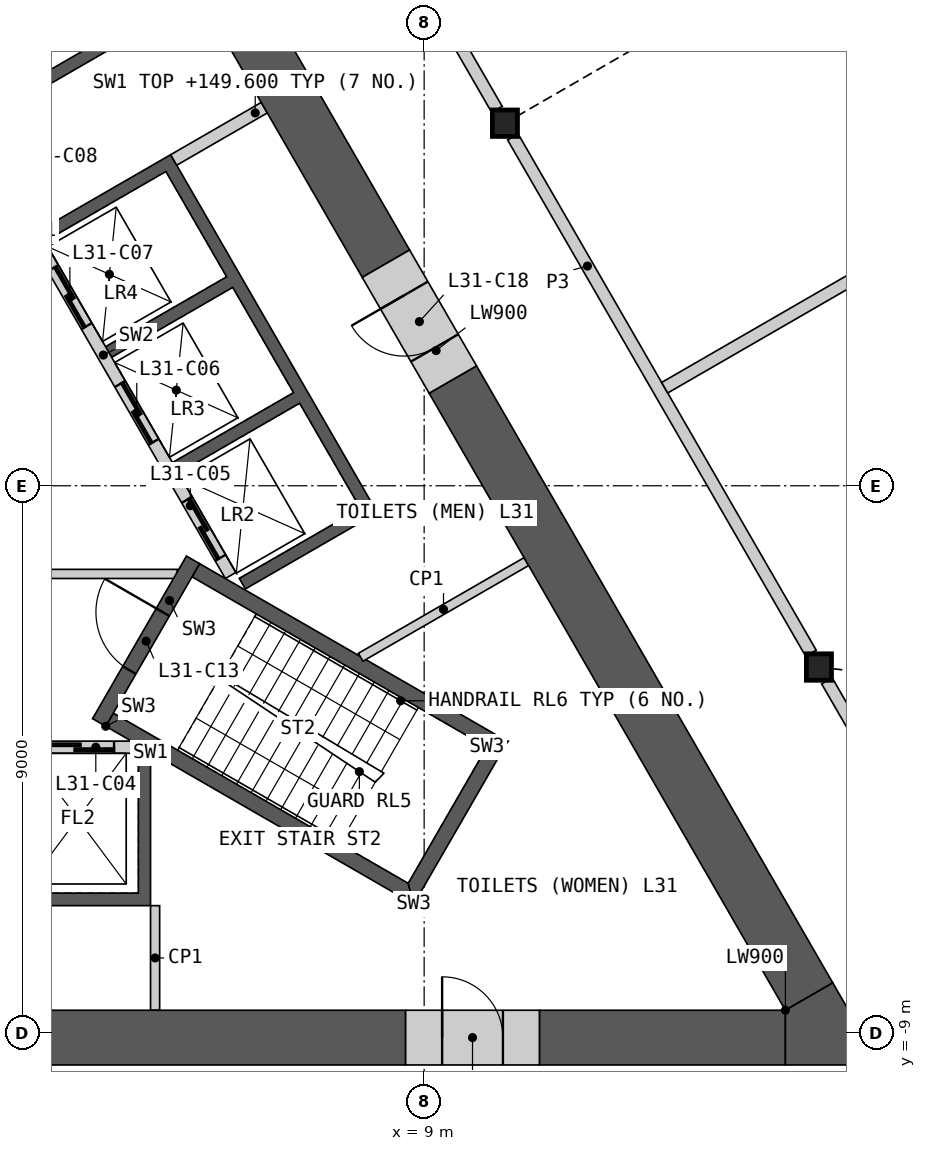
"""IFC4 building model, lengths in metres.
Left out: names, types, materials, properties, quantities, classifications, styles, units other than length and angle.
Written with IfcOpenShell. Run it as: python <this file> out.ifc"""

import sys

from ifc_helpers import new_model, si_unit, direction, frame, frame_2d, origin, origin_2d, place, context, subcontext, project, spatial, polyline, rectangle, i_section, outline, extrude, element, fill, save


model = new_model("IFC4")
c1 = context("Model", 3, precision=1e-05, world=origin(), true_north=direction((0.0, 1.0)))
c2 = subcontext(c1, "Body", "Model", "MODEL_VIEW")
j1 = project(units=[si_unit("LENGTHUNIT", "METRE"), si_unit("PLANEANGLEUNIT", "RADIAN")], contexts=[c1])
p1 = place(None, origin())
s1 = spatial("IfcSite", under=j1, at=p1, CompositionType="ELEMENT")
p2 = place(p1, origin())
s2 = spatial("IfcBuilding", under=s1, at=p2, CompositionType="ELEMENT")
p3 = place(p2, frame((0.0, 0.0, 145.8)))
s3 = spatial("IfcBuildingStorey", under=s2, at=p3, CompositionType="ELEMENT", Elevation=145.8)
for number, where, z_axis, x_axis in (
    (1, (15.493, -2.982, 0.0), (0.0, 0.0, 1.0), (1.0, 0.0, 0.0)),
    (2, (10.328, 5.963, 0.0), (0.0, 0.0, 1.0), (1.0, 0.0, 0.0)),
):
    element("IfcColumn", number, at=place(p3, frame(where, z_axis=z_axis, x_axis=x_axis)), inside=s3, PredefinedType="COLUMN", context=c2, shape_type="SweptSolid", body=[
        extrude(i_section(OverallWidth=0.412, OverallDepth=0.435, WebThickness=0.036, FlangeThickness=0.057, at=origin_2d()), origin(), (0.0, 0.0, 1.0), 4.2),
    ])
p4 = place(p3, origin())
e3 = element("IfcWall", 3, at=p4, inside=s3, PredefinedType="SHEAR", context=c2, shape_type="SweptSolid", body=[
    extrude(outline(polyline([(4.5, -4.4), (4.5, -6.906), (-4.5, -6.906), (-4.5, -4.4), (-4.3, -4.4), (-4.3, -6.7), (-2.3, -6.7), (-2.3, -4.4), (-2.1, -4.4), (-2.1, -6.7), (-0.1, -6.7), (-0.1, -4.4), (0.1, -4.4), (0.1, -6.7), (2.1, -6.7), (2.1, -4.4), (2.3, -4.4), (2.3, -6.7), (4.3, -6.7), (4.3, -4.4), (4.5, -4.4)])), origin(), (0.0, 0.0, 1.0), 3.8),
])
p5 = place(p3, frame((-4.187, -4.3, 0.0), z_axis=(0.0, 0.0, 1.0), x_axis=(1.0, 0.0, 0.0)))
e4 = element("IfcWall", 4, at=p5, inside=s3, PredefinedType="SOLIDWALL", context=c2, shape_type="SweptSolid", body=[
    extrude(rectangle(XDim=8.373, YDim=0.2, at=frame_2d((4.187, 0.0))), origin(), (0.0, 0.0, 1.0), 3.8),
])
p6 = place(p5, frame((0.287, 0.0, 0.0)))
e5 = element("IfcOpeningElement", 5, at=p6, cuts=e4, PredefinedType="OPENING", context=c2, shape_type="SweptSolid", body=[
    extrude(rectangle(XDim=1.2, YDim=2.1, at=frame_2d((0.6, 1.05))), frame((0.0, 0.11, 0.0), z_axis=(0.0, -1.0, 0.0), x_axis=(1.0, 0.0, 0.0)), (0.0, 0.0, 1.0), 0.22),
])
p7 = place(p5, frame((2.387, 0.0, 0.0)))
e6 = element("IfcOpeningElement", 6, at=p7, cuts=e4, PredefinedType="OPENING", context=c2, shape_type="SweptSolid", body=[
    extrude(rectangle(XDim=1.4, YDim=2.1, at=frame_2d((0.7, 1.05))), frame((0.0, 0.11, 0.0), z_axis=(0.0, -1.0, 0.0), x_axis=(1.0, 0.0, 0.0)), (0.0, 0.0, 1.0), 0.22),
])
p8 = place(p5, frame((4.737, 0.0, 0.0)))
e7 = element("IfcOpeningElement", 7, at=p8, cuts=e4, PredefinedType="OPENING", context=c2, shape_type="SweptSolid", body=[
    extrude(rectangle(XDim=1.1, YDim=2.1, at=frame_2d((0.55, 1.05))), frame((0.0, 0.11, 0.0), z_axis=(0.0, -1.0, 0.0), x_axis=(1.0, 0.0, 0.0)), (0.0, 0.0, 1.0), 0.22),
])
p9 = place(p5, frame((6.887, 0.0, 0.0)))
e8 = element("IfcOpeningElement", 8, at=p9, cuts=e4, PredefinedType="OPENING", context=c2, shape_type="SweptSolid", body=[
    extrude(rectangle(XDim=1.2, YDim=2.1, at=frame_2d((0.6, 1.05))), frame((0.0, 0.11, 0.0), z_axis=(0.0, -1.0, 0.0), x_axis=(1.0, 0.0, 0.0)), (0.0, 0.0, 1.0), 0.22),
])
p10 = place(p3, origin())
e9 = element("IfcWall", 9, at=p10, inside=s3, PredefinedType="SHEAR", context=c2, shape_type="SweptSolid", body=[
    extrude(outline(polyline([(1.561, 6.097), (3.731, 7.35), (3.831, 7.177), (1.66, 5.924), (1.561, 6.097)])), origin(), (0.0, 0.0, 1.0), 3.8),
])
p11 = place(p3, origin())
e10 = element("IfcWall", 10, at=p11, inside=s3, PredefinedType="SHEAR", context=c2, shape_type="SweptSolid", body=[
    extrude(outline(polyline([(2.66, 4.192), (4.831, 5.445), (8.231, -0.444), (6.061, -1.697), (5.96, -1.524), (7.952, -0.374), (6.952, 1.358), (4.96, 0.208), (4.861, 0.381), (6.852, 1.531), (5.852, 3.263), (3.861, 2.113), (3.76, 2.287), (5.752, 3.437), (4.752, 5.169), (2.76, 4.019), (2.66, 4.192)])), origin(), (0.0, 0.0, 1.0), 3.8),
])
p12 = place(p3, frame((5.817, -1.476, 0.0), z_axis=(0.0, 0.0, 1.0), x_axis=(-0.500002616675, 0.866023893041, 0.0)))
e11 = element("IfcWall", 11, at=p12, inside=s3, PredefinedType="SOLIDWALL", context=c2, shape_type="SweptSolid", body=[
    extrude(rectangle(XDim=8.373, YDim=0.2, at=frame_2d((4.187, 0.0))), origin(), (0.0, 0.0, 1.0), 3.8),
])
p13 = place(p12, frame((0.337, 0.0, 0.0)))
e12 = element("IfcOpeningElement", 12, at=p13, cuts=e11, PredefinedType="OPENING", context=c2, shape_type="SweptSolid", body=[
    extrude(rectangle(XDim=1.1, YDim=2.1, at=frame_2d((0.55, 1.05))), frame((0.0, 0.11, 0.0), z_axis=(0.0, -1.0, 0.0), x_axis=(1.0, 0.0, 0.0)), (0.0, 0.0, 1.0), 0.22),
])
p14 = place(p12, frame((2.537, 0.0, 0.0)))
e13 = element("IfcOpeningElement", 13, at=p14, cuts=e11, PredefinedType="OPENING", context=c2, shape_type="SweptSolid", body=[
    extrude(rectangle(XDim=1.1, YDim=2.1, at=frame_2d((0.55, 1.05))), frame((0.0, 0.11, 0.0), z_axis=(0.0, -1.0, 0.0), x_axis=(1.0, 0.0, 0.0)), (0.0, 0.0, 1.0), 0.22),
])
p15 = place(p12, frame((4.737, 0.0, 0.0)))
e14 = element("IfcOpeningElement", 14, at=p15, cuts=e11, PredefinedType="OPENING", context=c2, shape_type="SweptSolid", body=[
    extrude(rectangle(XDim=1.1, YDim=2.1, at=frame_2d((0.55, 1.05))), frame((0.0, 0.11, 0.0), z_axis=(0.0, -1.0, 0.0), x_axis=(1.0, 0.0, 0.0)), (0.0, 0.0, 1.0), 0.22),
])
p16 = place(p12, frame((7.037, 0.0, 0.0)))
e15 = element("IfcOpeningElement", 15, at=p16, cuts=e11, PredefinedType="OPENING", context=c2, shape_type="SweptSolid", body=[
    extrude(rectangle(XDim=0.9, YDim=2.1, at=frame_2d((0.45, 1.05))), frame((0.0, 0.11, 0.0), z_axis=(0.0, -1.0, 0.0), x_axis=(1.0, 0.0, 0.0)), (0.0, 0.0, 1.0), 0.22),
])
p17 = place(p3, frame((4.881, 5.358, 0.0), z_axis=(0.0, 0.0, 1.0), x_axis=(0.866024871741, 0.500000921525, 0.0)))
e16 = element("IfcWall", 16, at=p17, inside=s3, PredefinedType="SHEAR", context=c2, shape_type="SweptSolid", body=[
    extrude(rectangle(XDim=1.72, YDim=0.2, at=frame_2d((0.86, 0.0))), origin(), (0.0, 0.0, 1.0), 3.8),
])
p18 = place(p3, frame((-4.941, -1.45, 0.0), z_axis=(0.0, 0.0, 1.0), x_axis=(1.0, 0.0, 0.0)))
e17 = element("IfcWall", 17, at=p18, inside=s3, PredefinedType="PARTITIONING", context=c2, shape_type="SweptSolid", body=[
    extrude(rectangle(XDim=9.882, YDim=0.15, at=frame_2d((4.941, 0.0))), origin(), (0.0, 0.0, 1.0), 3.8),
])
p19 = place(p18, frame((4.391, 0.0, 0.0)))
e18 = element("IfcOpeningElement", 18, at=p19, cuts=e17, PredefinedType="OPENING", context=c2, shape_type="SweptSolid", body=[
    extrude(rectangle(XDim=1.1, YDim=2.1, at=frame_2d((0.55, 1.05))), frame((0.0, 0.085, 0.0), z_axis=(0.0, -1.0, 0.0), x_axis=(1.0, 0.0, 0.0)), (0.0, 0.0, 1.0), 0.17),
])
p20 = place(p3, origin())
e19 = element("IfcWall", 19, at=p20, inside=s3, PredefinedType="SHEAR", context=c2, shape_type="SweptSolid", body=[
    extrude(outline(polyline([(3.763, -3.956), (8.83, -6.881), (8.738, -6.539), (3.888, -3.739), (3.763, -3.956)])), origin(), (0.0, 0.0, 1.0), 3.8),
])
p21 = place(p3, origin())
e20 = element("IfcWall", 20, at=p21, inside=s3, PredefinedType="SHEAR", context=c2, shape_type="SweptSolid", body=[
    extrude(outline(polyline([(8.83, -6.881), (10.374, -4.206), (10.032, -4.298), (8.738, -6.539), (8.83, -6.881)])), origin(), (0.0, 0.0, 1.0), 3.8),
])
p22 = place(p3, origin())
e21 = element("IfcWall", 21, at=p22, inside=s3, PredefinedType="SHEAR", context=c2, shape_type="SweptSolid", body=[
    extrude(outline(polyline([(10.032, -4.298), (10.374, -4.206), (5.307, -1.281), (5.182, -1.498), (10.032, -4.298)])), origin(), (0.0, 0.0, 1.0), 3.8),
])
p23 = place(p3, frame((3.655, -3.893, 0.0), z_axis=(0.0, 0.0, 1.0), x_axis=(0.499982516597, 0.866035497597, 0.0)))
e22 = element("IfcWall", 22, at=p23, inside=s3, PredefinedType="SHEAR", context=c2, shape_type="SweptSolid", body=[
    extrude(rectangle(XDim=3.088, YDim=0.25, at=frame_2d((1.544, 0.0))), origin(), (0.0, 0.0, 1.0), 3.8),
])
p24 = place(p23, frame((0.994, 0.0, 0.0)))
e23 = element("IfcOpeningElement", 23, at=p24, cuts=e22, PredefinedType="OPENING", context=c2, shape_type="SweptSolid", body=[
    extrude(rectangle(XDim=1.1, YDim=2.1, at=frame_2d((0.55, 1.05))), frame((0.0, 0.135, 0.0), z_axis=(0.0, -1.0, 0.0), x_axis=(1.0, 0.0, 0.0)), (0.0, 0.0, 1.0), 0.27),
])
p25 = place(p3, frame((4.575, -6.906, 0.0), z_axis=(0.0, 0.0, 1.0), x_axis=(0.0, -1.0, 0.0)))
e24 = element("IfcWall", 24, at=p25, inside=s3, PredefinedType="PARTITIONING", context=c2, shape_type="SweptSolid", body=[
    extrude(rectangle(XDim=1.72, YDim=0.15, at=frame_2d((0.86, 0.0))), origin(), (0.0, 0.0, 1.0), 3.8),
])
p26 = place(p3, frame((10.681, -1.247, 0.0), z_axis=(0.0, 0.0, 1.0), x_axis=(-0.866018897435, -0.500011269158, 0.0)))
e25 = element("IfcWall", 25, at=p26, inside=s3, PredefinedType="PARTITIONING", context=c2, shape_type="SweptSolid", body=[
    extrude(rectangle(XDim=3.146, YDim=0.15, at=frame_2d((1.573, 0.0))), origin(), (0.0, 0.0, 1.0), 3.8),
])
p27 = place(p3, frame((1.1, -9.076, 0.0), z_axis=(0.0, 0.0, 1.0), x_axis=(1.0, 0.0, 0.0)))
e26 = element("IfcWall", 26, at=p27, inside=s3, PredefinedType="SHEAR", context=c2, shape_type="SweptSolid", body=[
    extrude(rectangle(XDim=7.595, YDim=0.9, at=frame_2d((3.798, 0.0))), origin(), (0.0, 0.0, 1.0), 3.8),
])
p28 = place(p3, frame((10.896, -9.076, 0.0), z_axis=(0.0, 0.0, 1.0), x_axis=(1.0, 0.0, 0.0)))
e27 = element("IfcWall", 27, at=p28, inside=s3, PredefinedType="SHEAR", context=c2, shape_type="SweptSolid", body=[
    extrude(rectangle(XDim=4.046, YDim=0.9, at=frame_2d((2.023, 0.0))), origin(), (0.0, 0.0, 1.0), 3.8),
])
p29 = place(p3, frame((8.372, 3.652, 0.0), z_axis=(0.0, 0.0, 1.0), x_axis=(-0.499997808738, 0.866026668906, 0.0)))
e28 = element("IfcWall", 28, at=p29, inside=s3, PredefinedType="SHEAR", context=c2, shape_type="SweptSolid", body=[
    extrude(rectangle(XDim=15.964, YDim=0.9, at=frame_2d((7.982, 0.0))), origin(), (0.0, 0.0, 1.0), 3.8),
])
p30 = place(p3, frame((15.331, -8.401, 0.0), z_axis=(0.0, 0.0, 1.0), x_axis=(-0.499995375004, 0.86602807401, 0.0)))
e29 = element("IfcWall", 29, at=p30, inside=s3, PredefinedType="SHEAR", context=c2, shape_type="SweptSolid", body=[
    extrude(rectangle(XDim=11.718, YDim=0.9, at=frame_2d((5.859, 0.0))), origin(), (0.0, 0.0, 1.0), 3.8),
])
p31 = place(p3, origin())
e30 = element("IfcWall", 30, at=p31, inside=s3, PredefinedType="SHEAR", context=c2, shape_type="SweptSolid", body=[
    extrude(outline(polyline([(14.941, -8.626), (15.721, -8.176), (16.5, -9.526), (14.941, -9.526), (14.941, -8.626)])), origin(), (0.0, 0.0, 1.0), 3.8),
])
p32 = place(p3, frame((8.696, -9.076, 0.0), z_axis=(0.0, 0.0, 1.0), x_axis=(1.0, 0.0, 0.0)))
e31 = element("IfcWall", 31, at=p32, inside=s3, PredefinedType="SHEAR", context=c2, shape_type="SweptSolid", body=[
    extrude(rectangle(XDim=2.2, YDim=0.9, at=frame_2d((1.1, 0.0))), origin(), (0.0, 0.0, 1.0), 3.8),
])
p33 = place(p32, frame((0.6, 0.0, 0.0)))
e32 = element("IfcOpeningElement", 32, at=p33, cuts=e31, PredefinedType="OPENING", context=c2, shape_type="SweptSolid", body=[
    extrude(rectangle(XDim=1.0, YDim=2.1, at=frame_2d((0.5, 1.05))), frame((0.0, 0.46, 0.0), z_axis=(0.0, -1.0, 0.0), x_axis=(1.0, 0.0, 0.0)), (0.0, 0.0, 1.0), 0.92),
])
p34 = place(p3, frame((9.472, 1.747, 0.0), z_axis=(0.0, 0.0, 1.0), x_axis=(-0.50002983664, 0.866008176907, 0.0)))
e33 = element("IfcWall", 33, at=p34, inside=s3, PredefinedType="SHEAR", context=c2, shape_type="SweptSolid", body=[
    extrude(rectangle(XDim=2.2, YDim=0.9, at=frame_2d((1.1, 0.0))), origin(), (0.0, 0.0, 1.0), 3.8),
])
p35 = place(p34, frame((0.6, 0.0, 0.0)))
e34 = element("IfcOpeningElement", 34, at=p35, cuts=e33, PredefinedType="OPENING", context=c2, shape_type="SweptSolid", body=[
    extrude(rectangle(XDim=1.0, YDim=2.1, at=frame_2d((0.5, 1.05))), frame((0.0, 0.46, 0.0), z_axis=(0.0, -1.0, 0.0), x_axis=(1.0, 0.0, 0.0)), (0.0, 0.0, 1.0), 0.92),
])
p36 = place(p3, frame((10.46, 5.736, 0.0), z_axis=(0.0, 0.0, 1.0), x_axis=(0.500004141693, -0.866023012564, 0.0)))
e35 = element("IfcWall", 35, at=p36, inside=s3, PredefinedType="PARTITIONING", context=c2, shape_type="SweptSolid", body=[
    extrude(rectangle(XDim=9.803, YDim=0.2, at=frame_2d((4.902, 0.0))), origin(), (0.0, 0.0, 1.0), 3.8),
])
p37 = place(p3, frame((5.295, 14.68, 0.0), z_axis=(0.0, 0.0, 1.0), x_axis=(0.500012035596, -0.866018454918, 0.0)))
e36 = element("IfcWall", 36, at=p37, inside=s3, PredefinedType="PARTITIONING", context=c2, shape_type="SweptSolid", body=[
    extrude(rectangle(XDim=9.803, YDim=0.2, at=frame_2d((4.902, 0.0))), origin(), (0.0, 0.0, 1.0), 3.8),
])
p38 = place(p37, frame((6.853, 0.0, 0.0)))
e37 = element("IfcOpeningElement", 37, at=p38, cuts=e36, PredefinedType="OPENING", context=c2, shape_type="SweptSolid", body=[
    extrude(rectangle(XDim=1.0, YDim=2.1, at=frame_2d((0.5, 1.05))), frame((0.0, 0.11, 0.0), z_axis=(0.0, -1.0, 0.0), x_axis=(1.0, 0.0, 0.0)), (0.0, 0.0, 1.0), 0.22),
])
p39 = place(p3, frame((15.624, -3.209, 0.0), z_axis=(0.0, 0.0, 1.0), x_axis=(0.499997920671, -0.866026604282, 0.0)))
e38 = element("IfcWall", 38, at=p39, inside=s3, PredefinedType="PARTITIONING", context=c2, shape_type="SweptSolid", body=[
    extrude(rectangle(XDim=6.24, YDim=0.2, at=frame_2d((3.12, 0.0))), origin(), (0.0, 0.0, 1.0), 3.8),
])
p40 = place(p39, frame((2.169, 0.0, 0.0)))
e39 = element("IfcOpeningElement", 39, at=p40, cuts=e38, PredefinedType="OPENING", context=c2, shape_type="SweptSolid", body=[
    extrude(rectangle(XDim=1.8, YDim=2.1, at=frame_2d((0.9, 1.05))), frame((0.0, 0.11, 0.0), z_axis=(0.0, -1.0, 0.0), x_axis=(1.0, 0.0, 0.0)), (0.0, 0.0, 1.0), 0.22),
])
p41 = place(p3, frame((12.956, 1.613, 0.0), z_axis=(0.0, 0.0, 1.0), x_axis=(0.866032027724, 0.499988526824, 0.0)))
e40 = element("IfcWall", 40, at=p41, inside=s3, PredefinedType="PARTITIONING", context=c2, shape_type="SweptSolid", body=[
    extrude(rectangle(XDim=8.26, YDim=0.2, at=frame_2d((4.13, 0.0))), origin(), (0.0, 0.0, 1.0), 2.885),
])
p42 = place(p9, origin())
e41 = element("IfcDoor", 41, at=p42, inside=s3, OperationType="SLIDING_TO_LEFT", PredefinedType="DOOR", context=c2, shape_type="SweptSolid", body=[
    extrude(rectangle(XDim=1.2, YDim=2.1, at=frame_2d((0.6, 1.05))), frame((0.0, 0.025, 0.0), z_axis=(0.0, -1.0, 0.0), x_axis=(1.0, 0.0, 0.0)), (0.0, 0.0, 1.0), 0.05),
])
fill(e8, e41)
p43 = place(p13, origin())
e42 = element("IfcDoor", 42, at=p43, inside=s3, OperationType="SLIDING_TO_LEFT", PredefinedType="DOOR", context=c2, shape_type="SweptSolid", body=[
    extrude(rectangle(XDim=1.1, YDim=2.1, at=frame_2d((0.55, 1.05))), frame((0.0, 0.025, 0.0), z_axis=(0.0, -1.0, 0.0), x_axis=(1.0, 0.0, 0.0)), (0.0, 0.0, 1.0), 0.05),
])
fill(e12, e42)
p44 = place(p14, origin())
e43 = element("IfcDoor", 43, at=p44, inside=s3, OperationType="SLIDING_TO_LEFT", PredefinedType="DOOR", context=c2, shape_type="SweptSolid", body=[
    extrude(rectangle(XDim=1.1, YDim=2.1, at=frame_2d((0.55, 1.05))), frame((0.0, 0.025, 0.0), z_axis=(0.0, -1.0, 0.0), x_axis=(1.0, 0.0, 0.0)), (0.0, 0.0, 1.0), 0.05),
])
fill(e13, e43)
p45 = place(p15, origin())
e44 = element("IfcDoor", 44, at=p45, inside=s3, OperationType="SLIDING_TO_LEFT", PredefinedType="DOOR", context=c2, shape_type="SweptSolid", body=[
    extrude(rectangle(XDim=1.1, YDim=2.1, at=frame_2d((0.55, 1.05))), frame((0.0, 0.025, 0.0), z_axis=(0.0, -1.0, 0.0), x_axis=(1.0, 0.0, 0.0)), (0.0, 0.0, 1.0), 0.05),
])
fill(e14, e44)
p46 = place(p24, origin())
e45 = element("IfcDoor", 45, at=p46, inside=s3, OperationType="SINGLE_SWING_RIGHT", PredefinedType="DOOR", context=c2, shape_type="SweptSolid", body=[
    extrude(rectangle(XDim=1.1, YDim=2.1, at=frame_2d((0.55, 1.05))), frame((0.0, 0.025, 0.0), z_axis=(0.0, -1.0, 0.0), x_axis=(1.0, 0.0, 0.0)), (0.0, 0.0, 1.0), 0.05),
])
fill(e23, e45)
p47 = place(p33, origin())
e46 = element("IfcDoor", 46, at=p47, inside=s3, OperationType="SINGLE_SWING_LEFT", PredefinedType="DOOR", context=c2, shape_type="SweptSolid", body=[
    extrude(rectangle(XDim=1.0, YDim=2.1, at=frame_2d((0.5, 1.05))), frame((0.0, 0.205, 0.0), z_axis=(0.0, -1.0, 0.0), x_axis=(1.0, 0.0, 0.0)), (0.0, 0.0, 1.0), 0.05),
])
fill(e32, e46)
p48 = place(p35, origin())
e47 = element("IfcDoor", 47, at=p48, inside=s3, OperationType="SINGLE_SWING_RIGHT", PredefinedType="DOOR", context=c2, shape_type="SweptSolid", body=[
    extrude(rectangle(XDim=1.0, YDim=2.1, at=frame_2d((0.5, 1.05))), frame((0.0, 0.205, 0.0), z_axis=(0.0, -1.0, 0.0), x_axis=(1.0, 0.0, 0.0)), (0.0, 0.0, 1.0), 0.05),
])
fill(e34, e47)
save(model, sys.argv[1])
